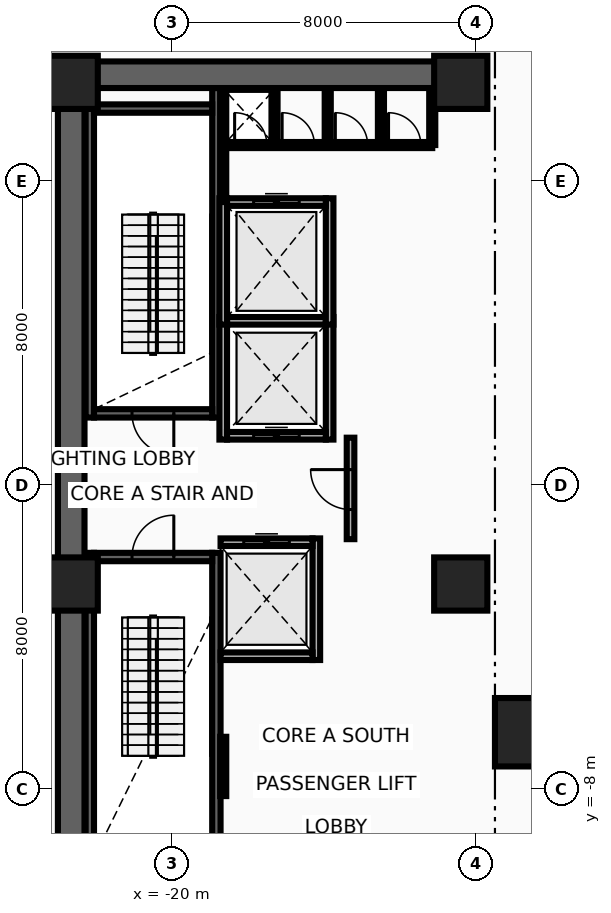
"""IFC4 building model, lengths in metres.
Left out: names, types, materials, properties, quantities, classifications, styles, units other than length and angle.
Written with IfcOpenShell. Run it as: python <this file> out.ifc"""

import sys

from ifc_helpers import new_model, si_unit, direction, frame, frame_2d, origin, origin_2d, place, context, subcontext, project, spatial, rectangle, extrude, source, transform, mapped, element, fill, save


model = new_model("IFC4")
c1 = context("Model", 3, precision=1e-05, world=origin(), true_north=direction((0.0, 1.0)))
c2 = subcontext(c1, "Body", "Model", "MODEL_VIEW")
j1 = project(units=[si_unit("LENGTHUNIT", "METRE"), si_unit("PLANEANGLEUNIT", "RADIAN")], contexts=[c1])
p1 = place(None, origin())
s1 = spatial("IfcSite", under=j1, at=p1, CompositionType="ELEMENT")
p2 = place(p1, origin())
s2 = spatial("IfcBuilding", under=s1, at=p2, CompositionType="ELEMENT")
p3 = place(p2, frame((0.0, 0.0, -4.8)))
s3 = spatial("IfcBuildingStorey", under=s2, at=p3, CompositionType="ELEMENT", Elevation=-4.8)
for number, where, z_axis, x_axis in (
    (1, (-22.16, 1.78, 0.0), (0.0, 0.0, 1.0), (0.0, 1.0, 0.0)),
    (2, (-18.83, 1.78, 0.0), (0.0, 0.0, 1.0), (0.0, 1.0, 0.0)),
):
    element("IfcWall", number, at=place(p3, frame(where, z_axis=z_axis, x_axis=x_axis)), inside=s3, PredefinedType="SHEAR", context=c2, shape_type="SweptSolid", body=[
        extrude(rectangle(XDim=8.67, YDim=0.22, at=frame_2d((4.335, 0.0))), origin(), (0.0, 0.0, 1.0), 4.52),
    ])
p4 = place(p3, frame((-22.05, 1.89, 0.0), z_axis=(0.0, 0.0, 1.0), x_axis=(1.0, 0.0, 0.0)))
e3 = element("IfcWall", 3, at=p4, inside=s3, PredefinedType="SHEAR", context=c2, shape_type="SweptSolid", body=[
    extrude(rectangle(XDim=3.11, YDim=0.22, at=frame_2d((1.555, 0.0))), origin(), (0.0, 0.0, 1.0), 4.52),
])
p5 = place(p4, frame((1.0, 0.0, 0.0)))
e4 = element("IfcOpeningElement", 4, at=p5, cuts=e3, PredefinedType="OPENING", context=c2, shape_type="SweptSolid", body=[
    extrude(rectangle(XDim=1.1, YDim=2.15, at=frame_2d((0.55, 1.075))), frame((0.0, 0.125, 0.0), z_axis=(0.0, -1.0, 0.0), x_axis=(1.0, 0.0, 0.0)), (0.0, 0.0, 1.0), 0.25),
])
p6 = place(p3, frame((-22.05, 9.91, 0.0), z_axis=(0.0, 0.0, 1.0), x_axis=(1.0, 0.0, 0.0)))
e5 = element("IfcWall", 5, at=p6, inside=s3, PredefinedType="SHEAR", context=c2, shape_type="SweptSolid", body=[
    extrude(rectangle(XDim=3.11, YDim=0.22, at=frame_2d((1.555, 0.0))), origin(), (0.0, 0.0, 1.0), 4.52),
])
for number, where, z_axis, x_axis in (
    (6, (-22.16, -10.45, 0.0), (0.0, 0.0, 1.0), (0.0, 1.0, 0.0)),
    (7, (-18.83, -10.45, 0.0), (0.0, 0.0, 1.0), (0.0, 1.0, 0.0)),
):
    element("IfcWall", number, at=place(p3, frame(where, z_axis=z_axis, x_axis=x_axis)), inside=s3, PredefinedType="SHEAR", context=c2, shape_type="SweptSolid", body=[
        extrude(rectangle(XDim=8.67, YDim=0.22, at=frame_2d((4.335, 0.0))), origin(), (0.0, 0.0, 1.0), 4.52),
    ])
p7 = place(p3, frame((-22.05, -1.89, 0.0), z_axis=(0.0, 0.0, 1.0), x_axis=(1.0, 0.0, 0.0)))
e8 = element("IfcWall", 8, at=p7, inside=s3, PredefinedType="SHEAR", context=c2, shape_type="SweptSolid", body=[
    extrude(rectangle(XDim=3.11, YDim=0.22, at=frame_2d((1.555, 0.0))), origin(), (0.0, 0.0, 1.0), 4.52),
])
p8 = place(p7, frame((1.0, 0.0, 0.0)))
e9 = element("IfcOpeningElement", 9, at=p8, cuts=e8, PredefinedType="OPENING", context=c2, shape_type="SweptSolid", body=[
    extrude(rectangle(XDim=1.1, YDim=2.15, at=frame_2d((0.55, 1.075))), frame((0.0, 0.125, 0.0), z_axis=(0.0, -1.0, 0.0), x_axis=(1.0, 0.0, 0.0)), (0.0, 0.0, 1.0), 0.25),
])
p9 = place(p3, frame((-22.65, -11.15, 0.0), z_axis=(0.0, 0.0, 1.0), x_axis=(0.0, 1.0, 0.0)))
e10 = element("IfcWall", 10, at=p9, inside=s3, PredefinedType="SHEAR", context=c2, shape_type="SweptSolid", body=[
    extrude(rectangle(XDim=22.3, YDim=0.7, at=frame_2d((11.15, 0.0))), origin(), (0.0, 0.0, 1.0), 4.52),
])
p10 = place(p3, frame((-22.65, 10.8, 0.0), z_axis=(0.0, 0.0, 1.0), x_axis=(1.0, 0.0, 0.0)))
e11 = element("IfcWall", 11, at=p10, inside=s3, PredefinedType="SHEAR", context=c2, shape_type="SweptSolid", body=[
    extrude(rectangle(XDim=10.25, YDim=0.7, at=frame_2d((5.125, 0.0))), origin(), (0.0, 0.0, 1.0), 4.52),
])
m1 = source(origin(), c2, "Body", "SweptSolid", [
    extrude(rectangle(XDim=1.4, YDim=1.4, at=origin_2d()), origin(), (0.0, 0.0, 1.0), 4.8),
])
for number, where, z_axis, x_axis in (
    (12, (-22.65, -2.6, 0.0), (0.0, 0.0, 1.0), (1.0, 0.0, 0.0)),
    (13, (-12.4, -2.6, 0.0), (0.0, 0.0, 1.0), (1.0, 0.0, 0.0)),
    (14, (-22.65, 10.6, 0.0), (0.0, 0.0, 1.0), (1.0, 0.0, 0.0)),
    (15, (-12.4, 10.6, 0.0), (0.0, 0.0, 1.0), (1.0, 0.0, 0.0)),
):
    element("IfcColumn", number, at=place(p3, frame(where, z_axis=z_axis, x_axis=x_axis)), inside=s3, PredefinedType="COLUMN", context=c2, shape_type="MappedRepresentation", body=[
        mapped(m1, transform((0.0, 0.0, 0.0), x_axis=(1.0, 0.0, 0.0), y_axis=(0.0, 1.0, 0.0), z_axis=(0.0, 0.0, 1.0), scale=1.0)),
    ])
m2 = source(origin(), c2, "Body", "SweptSolid", [
    extrude(rectangle(XDim=1.8, YDim=1.8, at=origin_2d()), origin(), (0.0, 0.0, 1.0), 4.8),
])
p11 = place(p3, frame((-10.6, -6.5, 0.0), z_axis=(0.0, 0.0, 1.0), x_axis=(1.0, 0.0, 0.0)))
e16 = element("IfcColumn", 16, at=p11, inside=s3, PredefinedType="COLUMN", context=c2, shape_type="MappedRepresentation", body=[
    mapped(m2, transform((0.0, 0.0, 0.0), x_axis=(1.0, 0.0, 0.0), y_axis=(0.0, 1.0, 0.0), z_axis=(0.0, 0.0, 1.0), scale=1.0)),
])
for number, where, z_axis, x_axis in (
    (17, (-18.65, 1.2, 0.0), (0.0, 0.0, 1.0), (0.0, 1.0, 0.0)),
    (18, (-15.85, 1.2, 0.0), (0.0, 0.0, 1.0), (0.0, 1.0, 0.0)),
):
    element("IfcWall", number, at=place(p3, frame(where, z_axis=z_axis, x_axis=x_axis)), inside=s3, PredefinedType="MOVABLE", context=c2, shape_type="SweptSolid", body=[
        extrude(rectangle(XDim=3.225, YDim=0.2, at=frame_2d((1.613, 0.0))), origin(), (0.0, 0.0, 1.0), 4.52),
    ])
p12 = place(p3, frame((-18.55, 1.3, 0.0), z_axis=(0.0, 0.0, 1.0), x_axis=(1.0, 0.0, 0.0)))
e19 = element("IfcWall", 19, at=p12, inside=s3, PredefinedType="MOVABLE", context=c2, shape_type="SweptSolid", body=[
    extrude(rectangle(XDim=2.6, YDim=0.2, at=frame_2d((1.3, 0.0))), origin(), (0.0, 0.0, 1.0), 4.52),
])
p13 = place(p12, frame((0.7, 0.0, 0.0)))
e20 = element("IfcOpeningElement", 20, at=p13, cuts=e19, PredefinedType="OPENING", context=c2, shape_type="SweptSolid", body=[
    extrude(rectangle(XDim=1.2, YDim=2.1, at=frame_2d((0.6, 1.05))), frame((0.0, 0.115, 0.0), z_axis=(0.0, -1.0, 0.0), x_axis=(1.0, 0.0, 0.0)), (0.0, 0.0, 1.0), 0.23),
])
p14 = place(p3, frame((-18.55, 4.325, 0.0), z_axis=(0.0, 0.0, 1.0), x_axis=(1.0, 0.0, 0.0)))
e21 = element("IfcWall", 21, at=p14, inside=s3, PredefinedType="MOVABLE", context=c2, shape_type="SweptSolid", body=[
    extrude(rectangle(XDim=2.6, YDim=0.2, at=frame_2d((1.3, 0.0))), origin(), (0.0, 0.0, 1.0), 4.52),
])
p15 = place(p3, frame((-16.2, -4.6, 0.0), z_axis=(0.0, 0.0, 1.0), x_axis=(0.0, 1.0, 0.0)))
e22 = element("IfcWall", 22, at=p15, inside=s3, PredefinedType="MOVABLE", context=c2, shape_type="SweptSolid", body=[
    extrude(rectangle(XDim=3.2, YDim=0.2, at=frame_2d((1.6, 0.0))), origin(), (0.0, 0.0, 1.0), 4.52),
])
p16 = place(p3, frame((-18.72, -4.5, 0.0), z_axis=(0.0, 0.0, 1.0), x_axis=(1.0, 0.0, 0.0)))
e23 = element("IfcWall", 23, at=p16, inside=s3, PredefinedType="MOVABLE", context=c2, shape_type="SweptSolid", body=[
    extrude(rectangle(XDim=2.42, YDim=0.2, at=frame_2d((1.21, 0.0))), origin(), (0.0, 0.0, 1.0), 4.52),
])
p17 = place(p3, frame((-18.72, -1.5, 0.0), z_axis=(0.0, 0.0, 1.0), x_axis=(1.0, 0.0, 0.0)))
e24 = element("IfcWall", 24, at=p17, inside=s3, PredefinedType="MOVABLE", context=c2, shape_type="SweptSolid", body=[
    extrude(rectangle(XDim=2.42, YDim=0.2, at=frame_2d((1.21, 0.0))), origin(), (0.0, 0.0, 1.0), 4.52),
])
p18 = place(p17, frame((0.61, 0.0, 0.0)))
e25 = element("IfcOpeningElement", 25, at=p18, cuts=e24, PredefinedType="OPENING", context=c2, shape_type="SweptSolid", body=[
    extrude(rectangle(XDim=1.2, YDim=2.1, at=frame_2d((0.6, 1.05))), frame((0.0, 0.115, 0.0), z_axis=(0.0, -1.0, 0.0), x_axis=(1.0, 0.0, 0.0)), (0.0, 0.0, 1.0), 0.23),
])
for number, where, z_axis, x_axis in (
    (26, (-18.65, 4.225, 0.0), (0.0, 0.0, 1.0), (0.0, 1.0, 0.0)),
    (27, (-15.85, 4.225, 0.0), (0.0, 0.0, 1.0), (0.0, 1.0, 0.0)),
):
    element("IfcWall", number, at=place(p3, frame(where, z_axis=z_axis, x_axis=x_axis)), inside=s3, PredefinedType="MOVABLE", context=c2, shape_type="SweptSolid", body=[
        extrude(rectangle(XDim=3.325, YDim=0.2, at=frame_2d((1.663, 0.0))), origin(), (0.0, 0.0, 1.0), 4.52),
    ])
p19 = place(p3, frame((-18.55, 7.45, 0.0), z_axis=(0.0, 0.0, 1.0), x_axis=(1.0, 0.0, 0.0)))
e28 = element("IfcWall", 28, at=p19, inside=s3, PredefinedType="MOVABLE", context=c2, shape_type="SweptSolid", body=[
    extrude(rectangle(XDim=2.6, YDim=0.2, at=frame_2d((1.3, 0.0))), origin(), (0.0, 0.0, 1.0), 4.52),
])
p20 = place(p19, frame((0.7, 0.0, 0.0)))
e29 = element("IfcOpeningElement", 29, at=p20, cuts=e28, PredefinedType="OPENING", context=c2, shape_type="SweptSolid", body=[
    extrude(rectangle(XDim=1.2, YDim=2.1, at=frame_2d((0.6, 1.05))), frame((0.0, 0.115, 0.0), z_axis=(0.0, -1.0, 0.0), x_axis=(1.0, 0.0, 0.0)), (0.0, 0.0, 1.0), 0.23),
])
p21 = place(p3, frame((-15.3, -1.42, 0.0), z_axis=(0.0, 0.0, 1.0), x_axis=(0.0, 1.0, 0.0)))
e30 = element("IfcWall", 30, at=p21, inside=s3, PredefinedType="PARTITIONING", context=c2, shape_type="SweptSolid", body=[
    extrude(rectangle(XDim=2.67, YDim=0.2, at=frame_2d((1.335, 0.0))), origin(), (0.0, 0.0, 1.0), 4.52),
])
p22 = place(p21, frame((0.78, 0.0, 0.0)))
e31 = element("IfcOpeningElement", 31, at=p22, cuts=e30, PredefinedType="OPENING", context=c2, shape_type="SweptSolid", body=[
    extrude(rectangle(XDim=1.05, YDim=2.15, at=frame_2d((0.525, 1.075))), frame((0.0, 0.115, 0.0), z_axis=(0.0, -1.0, 0.0), x_axis=(1.0, 0.0, 0.0)), (0.0, 0.0, 1.0), 0.23),
])
p23 = place(p3, frame((-18.65, 7.45, 0.0), z_axis=(0.0, 0.0, 1.0), x_axis=(0.0, 1.0, 0.0)))
e32 = element("IfcWall", 32, at=p23, inside=s3, PredefinedType="PARTITIONING", context=c2, shape_type="SweptSolid", body=[
    extrude(rectangle(XDim=2.93, YDim=0.16, at=frame_2d((1.465, 0.0))), origin(), (0.0, 0.0, 1.0), 3.557),
])
p24 = place(p3, frame((-18.65, -8.18, 0.0), z_axis=(0.0, 0.0, 1.0), x_axis=(0.0, 1.0, 0.0)))
e33 = element("IfcWall", 33, at=p24, inside=s3, PredefinedType="PARTITIONING", context=c2, shape_type="SweptSolid", body=[
    extrude(rectangle(XDim=1.56, YDim=0.16, at=frame_2d((0.78, 0.0))), origin(), (0.0, 0.0, 1.0), 4.52),
])
p25 = place(p3, frame((-18.65, 8.95, 0.0), z_axis=(0.0, 0.0, 1.0), x_axis=(1.0, 0.0, 0.0)))
e34 = element("IfcWall", 34, at=p25, inside=s3, PredefinedType="PARTITIONING", context=c2, shape_type="SweptSolid", body=[
    extrude(rectangle(XDim=5.5, YDim=0.16, at=frame_2d((2.75, 0.0))), origin(), (0.0, 0.0, 1.0), 4.52),
])
p26 = place(p25, frame((0.3, 0.0, 0.0)))
e35 = element("IfcOpeningElement", 35, at=p26, cuts=e34, PredefinedType="OPENING", context=c2, shape_type="SweptSolid", body=[
    extrude(rectangle(XDim=0.85, YDim=2.05, at=frame_2d((0.425, 1.025))), frame((0.0, 0.095, 0.0), z_axis=(0.0, -1.0, 0.0), x_axis=(1.0, 0.0, 0.0)), (0.0, 0.0, 1.0), 0.19),
])
p27 = place(p25, frame((1.55, 0.0, 0.0)))
e36 = element("IfcOpeningElement", 36, at=p27, cuts=e34, PredefinedType="OPENING", context=c2, shape_type="SweptSolid", body=[
    extrude(rectangle(XDim=0.85, YDim=2.05, at=frame_2d((0.425, 1.025))), frame((0.0, 0.095, 0.0), z_axis=(0.0, -1.0, 0.0), x_axis=(1.0, 0.0, 0.0)), (0.0, 0.0, 1.0), 0.19),
])
p28 = place(p25, frame((2.95, 0.0, 0.0)))
e37 = element("IfcOpeningElement", 37, at=p28, cuts=e34, PredefinedType="OPENING", context=c2, shape_type="SweptSolid", body=[
    extrude(rectangle(XDim=0.85, YDim=2.05, at=frame_2d((0.425, 1.025))), frame((0.0, 0.095, 0.0), z_axis=(0.0, -1.0, 0.0), x_axis=(1.0, 0.0, 0.0)), (0.0, 0.0, 1.0), 0.19),
])
p29 = place(p25, frame((4.35, 0.0, 0.0)))
e38 = element("IfcOpeningElement", 38, at=p29, cuts=e34, PredefinedType="OPENING", context=c2, shape_type="SweptSolid", body=[
    extrude(rectangle(XDim=0.85, YDim=2.05, at=frame_2d((0.425, 1.025))), frame((0.0, 0.095, 0.0), z_axis=(0.0, -1.0, 0.0), x_axis=(1.0, 0.0, 0.0)), (0.0, 0.0, 1.0), 0.19),
])
for number, where, z_axis, x_axis in (
    (39, (-13.15, 8.95, 0.0), (0.0, 0.0, 1.0), (0.0, 1.0, 0.0)),
    (40, (-17.3, 8.95, 0.0), (0.0, 0.0, 1.0), (0.0, 1.0, 0.0)),
    (41, (-15.9, 8.95, 0.0), (0.0, 0.0, 1.0), (0.0, 1.0, 0.0)),
    (42, (-14.5, 8.95, 0.0), (0.0, 0.0, 1.0), (0.0, 1.0, 0.0)),
):
    element("IfcWall", number, at=place(p3, frame(where, z_axis=z_axis, x_axis=x_axis)), inside=s3, PredefinedType="PARTITIONING", context=c2, shape_type="SweptSolid", body=[
        extrude(rectangle(XDim=1.43, YDim=0.16, at=frame_2d((0.715, 0.0))), origin(), (0.0, 0.0, 1.0), 3.557),
    ])
p30 = place(p13, origin())
e43 = element("IfcDoor", 43, at=p30, inside=s3, OperationType="DOUBLE_DOOR_SLIDING", PredefinedType="DOOR", context=c2, shape_type="SweptSolid", body=[
    extrude(rectangle(XDim=1.2, YDim=2.1, at=frame_2d((0.6, 1.05))), frame((0.0, 0.025, 0.0), z_axis=(0.0, -1.0, 0.0), x_axis=(1.0, 0.0, 0.0)), (0.0, 0.0, 1.0), 0.05),
])
fill(e20, e43)
p31 = place(p18, origin())
e44 = element("IfcDoor", 44, at=p31, inside=s3, OperationType="DOUBLE_DOOR_SLIDING", PredefinedType="DOOR", context=c2, shape_type="SweptSolid", body=[
    extrude(rectangle(XDim=1.2, YDim=2.1, at=frame_2d((0.6, 1.05))), frame((0.0, 0.025, 0.0), z_axis=(0.0, -1.0, 0.0), x_axis=(1.0, 0.0, 0.0)), (0.0, 0.0, 1.0), 0.05),
])
fill(e25, e44)
p32 = place(p20, origin())
e45 = element("IfcDoor", 45, at=p32, inside=s3, OperationType="DOUBLE_DOOR_SLIDING", PredefinedType="DOOR", context=c2, shape_type="SweptSolid", body=[
    extrude(rectangle(XDim=1.2, YDim=2.1, at=frame_2d((0.6, 1.05))), frame((0.0, 0.025, 0.0), z_axis=(0.0, -1.0, 0.0), x_axis=(1.0, 0.0, 0.0)), (0.0, 0.0, 1.0), 0.05),
])
fill(e29, e45)
p33 = place(p22, origin())
e46 = element("IfcDoor", 46, at=p33, inside=s3, OperationType="SINGLE_SWING_RIGHT", PredefinedType="DOOR", context=c2, shape_type="SweptSolid", body=[
    extrude(rectangle(XDim=1.05, YDim=2.15, at=frame_2d((0.525, 1.075))), frame((0.0, 0.025, 0.0), z_axis=(0.0, -1.0, 0.0), x_axis=(1.0, 0.0, 0.0)), (0.0, 0.0, 1.0), 0.05),
])
fill(e31, e46)
p34 = place(p5, frame((1.1, 0.0, 0.0), z_axis=(0.0, 0.0, 1.0), x_axis=(-1.0, 0.0, 0.0)))
e47 = element("IfcDoor", 47, at=p34, inside=s3, OperationType="SINGLE_SWING_LEFT", PredefinedType="DOOR", context=c2, shape_type="SweptSolid", body=[
    extrude(rectangle(XDim=1.1, YDim=2.15, at=frame_2d((0.55, 1.075))), frame((0.0, 0.025, 0.0), z_axis=(0.0, -1.0, 0.0), x_axis=(1.0, 0.0, 0.0)), (0.0, 0.0, 1.0), 0.05),
])
fill(e4, e47)
p35 = place(p8, origin())
e48 = element("IfcDoor", 48, at=p35, inside=s3, OperationType="SINGLE_SWING_RIGHT", PredefinedType="DOOR", context=c2, shape_type="SweptSolid", body=[
    extrude(rectangle(XDim=1.1, YDim=2.15, at=frame_2d((0.55, 1.075))), frame((0.0, 0.025, 0.0), z_axis=(0.0, -1.0, 0.0), x_axis=(1.0, 0.0, 0.0)), (0.0, 0.0, 1.0), 0.05),
])
fill(e9, e48)
p36 = place(p26, origin())
e49 = element("IfcDoor", 49, at=p36, inside=s3, OperationType="SINGLE_SWING_LEFT", PredefinedType="DOOR", context=c2, shape_type="SweptSolid", body=[
    extrude(rectangle(XDim=0.85, YDim=2.05, at=frame_2d((0.425, 1.025))), frame((0.0, 0.025, 0.0), z_axis=(0.0, -1.0, 0.0), x_axis=(1.0, 0.0, 0.0)), (0.0, 0.0, 1.0), 0.05),
])
fill(e35, e49)
p37 = place(p27, origin())
e50 = element("IfcDoor", 50, at=p37, inside=s3, OperationType="SINGLE_SWING_RIGHT", PredefinedType="DOOR", context=c2, shape_type="SweptSolid", body=[
    extrude(rectangle(XDim=0.85, YDim=2.05, at=frame_2d((0.425, 1.025))), frame((0.0, 0.025, 0.0), z_axis=(0.0, -1.0, 0.0), x_axis=(1.0, 0.0, 0.0)), (0.0, 0.0, 1.0), 0.05),
])
fill(e36, e50)
p38 = place(p28, origin())
e51 = element("IfcDoor", 51, at=p38, inside=s3, OperationType="SINGLE_SWING_LEFT", PredefinedType="DOOR", context=c2, shape_type="SweptSolid", body=[
    extrude(rectangle(XDim=0.85, YDim=2.05, at=frame_2d((0.425, 1.025))), frame((0.0, 0.025, 0.0), z_axis=(0.0, -1.0, 0.0), x_axis=(1.0, 0.0, 0.0)), (0.0, 0.0, 1.0), 0.05),
])
fill(e37, e51)
p39 = place(p29, origin())
e52 = element("IfcDoor", 52, at=p39, inside=s3, OperationType="SINGLE_SWING_RIGHT", PredefinedType="DOOR", context=c2, shape_type="SweptSolid", body=[
    extrude(rectangle(XDim=0.85, YDim=2.05, at=frame_2d((0.425, 1.025))), frame((0.0, 0.025, 0.0), z_axis=(0.0, -1.0, 0.0), x_axis=(1.0, 0.0, 0.0)), (0.0, 0.0, 1.0), 0.05),
])
fill(e38, e52)
save(model, sys.argv[1])
